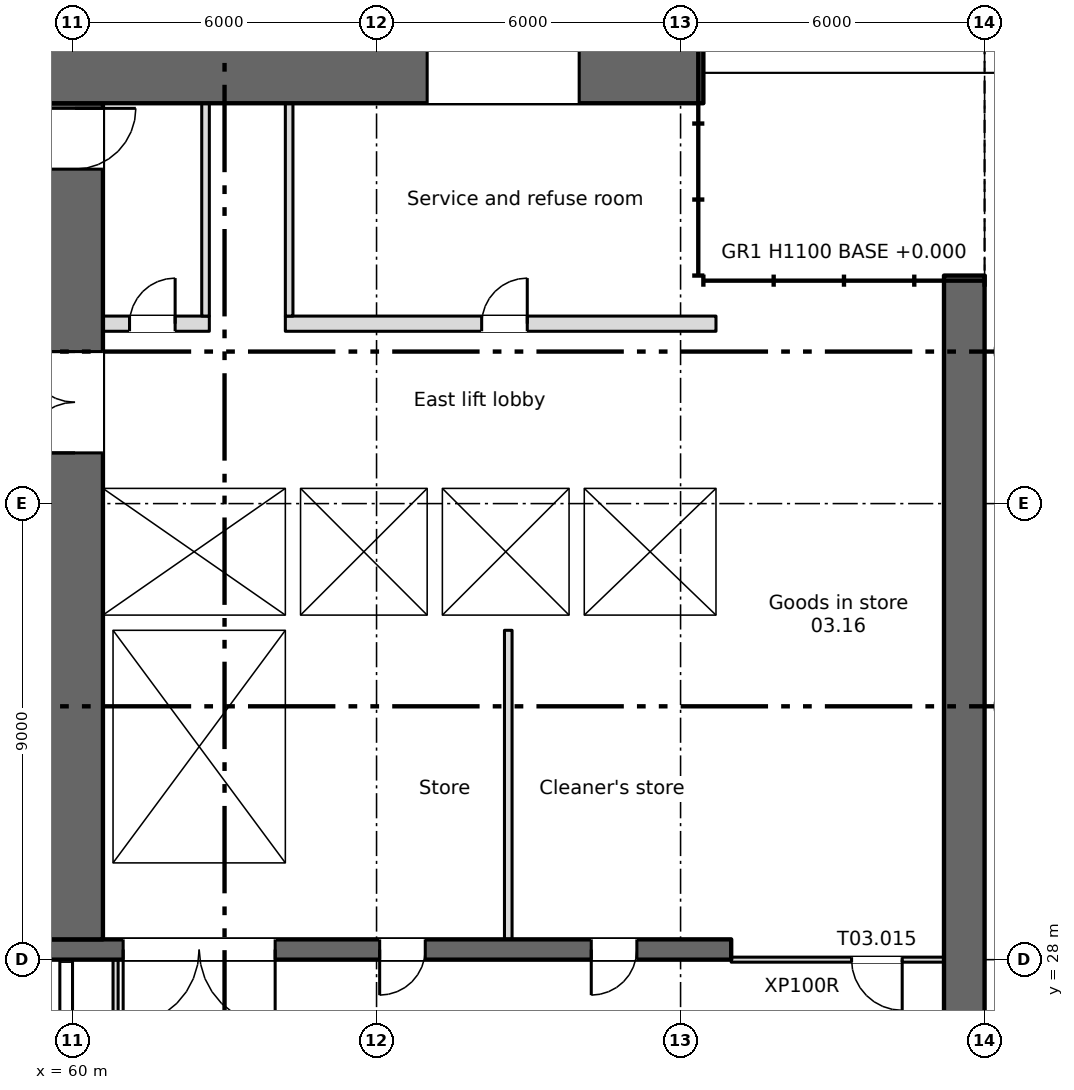
"""IFC4 building model, lengths in metres.
Left out: names, types, materials, properties, quantities, classifications, styles, units other than length and angle.
Written with IfcOpenShell. Run it as: python <this file> out.ifc"""

import sys

from ifc_helpers import new_model, si_unit, direction, frame, frame_2d, origin, place, context, subcontext, project, spatial, rectangle, extrude, element, fill, save


model = new_model("IFC4")
c1 = context("Model", 3, precision=1e-05, world=origin(), true_north=direction((0.0, 1.0)))
c2 = subcontext(c1, "Body", "Model", "MODEL_VIEW")
j1 = project(units=[si_unit("LENGTHUNIT", "METRE"), si_unit("PLANEANGLEUNIT", "RADIAN")], contexts=[c1])
p1 = place(None, origin())
s1 = spatial("IfcSite", under=j1, at=p1, CompositionType="ELEMENT")
p2 = place(p1, origin())
s2 = spatial("IfcBuilding", under=s1, at=p2, CompositionType="ELEMENT")
p3 = place(p2, origin())
s3 = spatial("IfcBuildingStorey", under=s2, at=p3, CompositionType="ELEMENT", Elevation=0.0)
p4 = place(p3, frame((77.6, 4.5, 0.0), z_axis=(0.0, 0.0, 1.0), x_axis=(0.0, 1.0, 0.0)))
e1 = element("IfcWall", 1, at=p4, inside=s3, PredefinedType="SHEAR", context=c2, shape_type="SweptSolid", body=[
    extrude(rectangle(XDim=37.0, YDim=0.8, at=frame_2d((18.5, 0.0))), origin(), (0.0, 0.0, 1.0), 6.0),
])
p5 = place(p3, frame((5.55, 45.45, 0.0), z_axis=(0.0, 0.0, 1.0), x_axis=(1.0, 0.0, 0.0)))
e2 = element("IfcWall", 2, at=p5, inside=s3, PredefinedType="SHEAR", context=c2, shape_type="SweptSolid", body=[
    extrude(rectangle(XDim=66.9, YDim=1.1, at=frame_2d((33.45, 0.0))), origin(), (0.0, 0.0, 1.0), 6.0),
])
p6 = place(p5, frame((61.45, 0.0, 0.0)))
e3 = element("IfcOpeningElement", 3, at=p6, cuts=e2, PredefinedType="OPENING", context=c2, shape_type="SweptSolid", body=[
    extrude(rectangle(XDim=3.0, YDim=3.0, at=frame_2d((1.5, 1.5))), frame((0.0, 0.56, 0.0), z_axis=(0.0, -1.0, 0.0), x_axis=(1.0, 0.0, 0.0)), (0.0, 0.0, 1.0), 1.12),
])
p7 = place(p3, frame((73.0, 28.2, 0.0), z_axis=(0.0, 0.0, 1.0), x_axis=(-1.0, 0.0, 0.0)))
e4 = element("IfcWall", 4, at=p7, inside=s3, PredefinedType="SHEAR", context=c2, shape_type="SweptSolid", body=[
    extrude(rectangle(XDim=66.3, YDim=0.4, at=frame_2d((33.15, 0.0))), origin(), (0.0, 0.0, 1.0), 6.0),
])
p8 = place(p7, frame((51.55, 0.0, 0.0)))
e5 = element("IfcOpeningElement", 5, at=p8, cuts=e4, PredefinedType="OPENING", context=c2, shape_type="SweptSolid", body=[
    extrude(rectangle(XDim=0.9, YDim=2.1, at=frame_2d((0.45, 1.05))), frame((0.0, 0.21, 0.0), z_axis=(0.0, -1.0, 0.0), x_axis=(1.0, 0.0, 0.0)), (0.0, 0.0, 1.0), 0.42),
])
p9 = place(p7, frame((16.837, 0.0, 0.0)))
e6 = element("IfcOpeningElement", 6, at=p9, cuts=e4, PredefinedType="OPENING", context=c2, shape_type="SweptSolid", body=[
    extrude(rectangle(XDim=0.9, YDim=2.1, at=frame_2d((0.45, 1.05))), frame((0.0, 0.21, 0.0), z_axis=(0.0, -1.0, 0.0), x_axis=(1.0, 0.0, 0.0)), (0.0, 0.0, 1.0), 0.42),
])
p10 = place(p7, frame((14.262, 0.0, 0.0)))
e7 = element("IfcOpeningElement", 7, at=p10, cuts=e4, PredefinedType="OPENING", context=c2, shape_type="SweptSolid", body=[
    extrude(rectangle(XDim=0.9, YDim=2.1, at=frame_2d((0.45, 1.05))), frame((0.0, 0.21, 0.0), z_axis=(0.0, -1.0, 0.0), x_axis=(1.0, 0.0, 0.0)), (0.0, 0.0, 1.0), 0.42),
])
p11 = place(p7, frame((64.05, 0.0, 0.0)))
e8 = element("IfcOpeningElement", 8, at=p11, cuts=e4, PredefinedType="OPENING", context=c2, shape_type="SweptSolid", body=[
    extrude(rectangle(XDim=0.9, YDim=2.1, at=frame_2d((0.45, 1.05))), frame((0.0, 0.21, 0.0), z_axis=(0.0, -1.0, 0.0), x_axis=(1.0, 0.0, 0.0)), (0.0, 0.0, 1.0), 0.42),
])
p12 = place(p7, frame((6.038, 0.0, 0.0)))
e9 = element("IfcOpeningElement", 9, at=p12, cuts=e4, PredefinedType="OPENING", context=c2, shape_type="SweptSolid", body=[
    extrude(rectangle(XDim=0.9, YDim=2.1, at=frame_2d((0.45, 1.05))), frame((0.0, 0.21, 0.0), z_axis=(0.0, -1.0, 0.0), x_axis=(1.0, 0.0, 0.0)), (0.0, 0.0, 1.0), 0.42),
])
p13 = place(p7, frame((1.863, 0.0, 0.0)))
e10 = element("IfcOpeningElement", 10, at=p13, cuts=e4, PredefinedType="OPENING", context=c2, shape_type="SweptSolid", body=[
    extrude(rectangle(XDim=0.9, YDim=2.1, at=frame_2d((0.45, 1.05))), frame((0.0, 0.21, 0.0), z_axis=(0.0, -1.0, 0.0), x_axis=(1.0, 0.0, 0.0)), (0.0, 0.0, 1.0), 0.42),
])
p14 = place(p7, frame((59.5, 0.0, 0.0)))
e11 = element("IfcOpeningElement", 11, at=p14, cuts=e4, PredefinedType="OPENING", context=c2, shape_type="SweptSolid", body=[
    extrude(rectangle(XDim=3.0, YDim=2.1, at=frame_2d((1.5, 1.05))), frame((0.0, 0.21, 0.0), z_axis=(0.0, -1.0, 0.0), x_axis=(1.0, 0.0, 0.0)), (0.0, 0.0, 1.0), 0.42),
])
p15 = place(p7, frame((32.5, 0.0, 0.0)))
e12 = element("IfcOpeningElement", 12, at=p15, cuts=e4, PredefinedType="OPENING", context=c2, shape_type="SweptSolid", body=[
    extrude(rectangle(XDim=3.0, YDim=2.1, at=frame_2d((1.5, 1.05))), frame((0.0, 0.21, 0.0), z_axis=(0.0, -1.0, 0.0), x_axis=(1.0, 0.0, 0.0)), (0.0, 0.0, 1.0), 0.42),
])
p16 = place(p7, frame((9.0, 0.0, 0.0)))
e13 = element("IfcOpeningElement", 13, at=p16, cuts=e4, PredefinedType="OPENING", context=c2, shape_type="SweptSolid", body=[
    extrude(rectangle(XDim=3.0, YDim=2.1, at=frame_2d((1.5, 1.05))), frame((0.0, 0.21, 0.0), z_axis=(0.0, -1.0, 0.0), x_axis=(1.0, 0.0, 0.0)), (0.0, 0.0, 1.0), 0.42),
])
p17 = place(p7, frame((43.0, 0.0, 0.0)))
e14 = element("IfcOpeningElement", 14, at=p17, cuts=e4, PredefinedType="OPENING", context=c2, shape_type="SweptSolid", body=[
    extrude(rectangle(XDim=2.0, YDim=2.1, at=frame_2d((1.0, 1.05))), frame((0.0, 0.21, 0.0), z_axis=(0.0, -1.0, 0.0), x_axis=(1.0, 0.0, 0.0)), (0.0, 0.0, 1.0), 0.42),
])
p18 = place(p7, frame((23.0, 0.0, 0.0)))
e15 = element("IfcOpeningElement", 15, at=p18, cuts=e4, PredefinedType="OPENING", context=c2, shape_type="SweptSolid", body=[
    extrude(rectangle(XDim=2.0, YDim=2.1, at=frame_2d((1.0, 1.05))), frame((0.0, 0.21, 0.0), z_axis=(0.0, -1.0, 0.0), x_axis=(1.0, 0.0, 0.0)), (0.0, 0.0, 1.0), 0.42),
])
p19 = place(p7, frame((39.05, 0.0, 0.0)))
e16 = element("IfcOpeningElement", 16, at=p19, cuts=e4, PredefinedType="OPENING", context=c2, shape_type="SweptSolid", body=[
    extrude(rectangle(XDim=2.4, YDim=2.1, at=frame_2d((1.2, 1.05))), frame((0.0, 0.21, 0.0), z_axis=(0.0, -1.0, 0.0), x_axis=(1.0, 0.0, 0.0)), (0.0, 0.0, 1.0), 0.42),
])
p20 = place(p7, frame((26.55, 0.0, 0.0)))
e17 = element("IfcOpeningElement", 17, at=p20, cuts=e4, PredefinedType="OPENING", context=c2, shape_type="SweptSolid", body=[
    extrude(rectangle(XDim=2.4, YDim=2.1, at=frame_2d((1.2, 1.05))), frame((0.0, 0.21, 0.0), z_axis=(0.0, -1.0, 0.0), x_axis=(1.0, 0.0, 0.0)), (0.0, 0.0, 1.0), 0.42),
])
p21 = place(p7, frame((56.1, 0.0, 0.0)))
e18 = element("IfcOpeningElement", 18, at=p21, cuts=e4, PredefinedType="OPENING", context=c2, shape_type="SweptSolid", body=[
    extrude(rectangle(XDim=2.4, YDim=2.1, at=frame_2d((1.2, 1.05))), frame((0.0, 0.21, 0.0), z_axis=(0.0, -1.0, 0.0), x_axis=(1.0, 0.0, 0.0)), (0.0, 0.0, 1.0), 0.42),
])
p22 = place(p7, frame((36.55, 0.0, 0.0)))
e19 = element("IfcOpeningElement", 19, at=p22, cuts=e4, PredefinedType="OPENING", context=c2, shape_type="SweptSolid", body=[
    extrude(rectangle(XDim=0.9, YDim=2.1, at=frame_2d((0.45, 1.05))), frame((0.0, 0.21, 0.0), z_axis=(0.0, -1.0, 0.0), x_axis=(1.0, 0.0, 0.0)), (0.0, 0.0, 1.0), 0.42),
])
p23 = place(p7, frame((30.55, 0.0, 0.0)))
e20 = element("IfcOpeningElement", 20, at=p23, cuts=e4, PredefinedType="OPENING", context=c2, shape_type="SweptSolid", body=[
    extrude(rectangle(XDim=0.9, YDim=2.1, at=frame_2d((0.45, 1.05))), frame((0.0, 0.21, 0.0), z_axis=(0.0, -1.0, 0.0), x_axis=(1.0, 0.0, 0.0)), (0.0, 0.0, 1.0), 0.42),
])
p24 = place(p3, frame((72.85, 28.4, 0.0), z_axis=(0.0, 0.0, 1.0), x_axis=(0.0, 1.0, 0.0)))
e21 = element("IfcWall", 21, at=p24, inside=s3, PredefinedType="SHEAR", context=c2, shape_type="SweptSolid", body=[
    extrude(rectangle(XDim=12.85, YDim=0.3, at=frame_2d((6.425, 0.0))), origin(), (0.0, 0.0, 1.0), 6.0),
])
p25 = place(p3, frame((64.35, 34.8, 0.0), z_axis=(0.0, 0.0, 1.0), x_axis=(0.0, 1.0, 0.0)))
e22 = element("IfcWall", 22, at=p25, inside=s3, PredefinedType="SHEAR", context=c2, shape_type="SweptSolid", body=[
    extrude(rectangle(XDim=2.5, YDim=0.3, at=frame_2d((1.25, 0.0))), origin(), (0.0, 0.0, 1.0), 6.0),
])
p26 = place(p3, frame((60.05, 28.4, 0.0), z_axis=(0.0, 0.0, 1.0), x_axis=(0.0, 1.0, 0.0)))
e23 = element("IfcWall", 23, at=p26, inside=s3, PredefinedType="SHEAR", context=c2, shape_type="SweptSolid", body=[
    extrude(rectangle(XDim=16.5, YDim=1.1, at=frame_2d((8.25, 0.0))), origin(), (0.0, 0.0, 1.0), 6.0),
])
p27 = place(p26, frame((9.6, 0.0, 0.0)))
e24 = element("IfcOpeningElement", 24, at=p27, cuts=e23, PredefinedType="OPENING", context=c2, shape_type="SweptSolid", body=[
    extrude(rectangle(XDim=2.0, YDim=2.1, at=frame_2d((1.0, 1.05))), frame((0.0, 0.56, 0.0), z_axis=(0.0, -1.0, 0.0), x_axis=(1.0, 0.0, 0.0)), (0.0, 0.0, 1.0), 1.12),
])
p28 = place(p26, frame((15.2, 0.0, 0.0)))
e25 = element("IfcOpeningElement", 25, at=p28, cuts=e23, PredefinedType="OPENING", context=c2, shape_type="SweptSolid", body=[
    extrude(rectangle(XDim=1.2, YDim=2.1, at=frame_2d((0.6, 1.05))), frame((0.0, 0.56, 0.0), z_axis=(0.0, -1.0, 0.0), x_axis=(1.0, 0.0, 0.0)), (0.0, 0.0, 1.0), 1.12),
])
p29 = place(p3, frame((60.7, 28.4, 0.0), z_axis=(0.0, 0.0, 1.0), x_axis=(0.0, 1.0, 0.0)))
e26 = element("IfcWall", 26, at=p29, inside=s3, PredefinedType="SHEAR", context=c2, shape_type="SweptSolid", body=[
    extrude(rectangle(XDim=6.1, YDim=0.2, at=frame_2d((3.05, 0.0))), origin(), (0.0, 0.0, 1.0), 6.0),
])
p30 = place(p3, frame((64.35, 28.4, 0.0), z_axis=(0.0, 0.0, 1.0), x_axis=(0.0, 1.0, 0.0)))
e27 = element("IfcWall", 27, at=p30, inside=s3, PredefinedType="SHEAR", context=c2, shape_type="SweptSolid", body=[
    extrude(rectangle(XDim=6.1, YDim=0.3, at=frame_2d((3.05, 0.0))), origin(), (0.0, 0.0, 1.0), 6.0),
])
p31 = place(p3, frame((60.6, 34.65, 0.0), z_axis=(0.0, 0.0, 1.0), x_axis=(1.0, 0.0, 0.0)))
e28 = element("IfcWall", 28, at=p31, inside=s3, PredefinedType="SHEAR", context=c2, shape_type="SweptSolid", body=[
    extrude(rectangle(XDim=12.1, YDim=0.3, at=frame_2d((6.05, 0.0))), origin(), (0.0, 0.0, 1.0), 6.0),
])
p32 = place(p3, frame((60.6, 37.45, 0.0), z_axis=(0.0, 0.0, 1.0), x_axis=(1.0, 0.0, 0.0)))
e29 = element("IfcWall", 29, at=p32, inside=s3, PredefinedType="SHEAR", context=c2, shape_type="SweptSolid", body=[
    extrude(rectangle(XDim=12.1, YDim=0.3, at=frame_2d((6.05, 0.0))), origin(), (0.0, 0.0, 1.0), 6.0),
])
p33 = place(p32, frame((1.25, 0.0, 0.0)))
e30 = element("IfcOpeningElement", 30, at=p33, cuts=e29, PredefinedType="OPENING", context=c2, shape_type="SweptSolid", body=[
    extrude(rectangle(XDim=1.1, YDim=2.1, at=frame_2d((0.55, 1.05))), frame((0.0, 0.16, 0.0), z_axis=(0.0, -1.0, 0.0), x_axis=(1.0, 0.0, 0.0)), (0.0, 0.0, 1.0), 0.32),
])
p34 = place(p32, frame((4.6, 0.0, 0.0)))
e31 = element("IfcOpeningElement", 31, at=p34, cuts=e29, PredefinedType="OPENING", context=c2, shape_type="SweptSolid", body=[
    extrude(rectangle(XDim=1.1, YDim=2.1, at=frame_2d((0.55, 1.05))), frame((0.0, 0.16, 0.0), z_axis=(0.0, -1.0, 0.0), x_axis=(1.0, 0.0, 0.0)), (0.0, 0.0, 1.0), 0.32),
])
p35 = place(p32, frame((7.4, 0.0, 0.0)))
e32 = element("IfcOpeningElement", 32, at=p35, cuts=e29, PredefinedType="OPENING", context=c2, shape_type="SweptSolid", body=[
    extrude(rectangle(XDim=1.1, YDim=2.1, at=frame_2d((0.55, 1.05))), frame((0.0, 0.16, 0.0), z_axis=(0.0, -1.0, 0.0), x_axis=(1.0, 0.0, 0.0)), (0.0, 0.0, 1.0), 0.32),
])
p36 = place(p32, frame((10.25, 0.0, 0.0)))
e33 = element("IfcOpeningElement", 33, at=p36, cuts=e29, PredefinedType="OPENING", context=c2, shape_type="SweptSolid", body=[
    extrude(rectangle(XDim=1.1, YDim=2.1, at=frame_2d((0.55, 1.05))), frame((0.0, 0.16, 0.0), z_axis=(0.0, -1.0, 0.0), x_axis=(1.0, 0.0, 0.0)), (0.0, 0.0, 1.0), 0.32),
])
p37 = place(p3, frame((60.6, 40.55, 0.0), z_axis=(0.0, 0.0, 1.0), x_axis=(1.0, 0.0, 0.0)))
e34 = element("IfcWall", 34, at=p37, inside=s3, PredefinedType="PARTITIONING", context=c2, shape_type="SweptSolid", body=[
    extrude(rectangle(XDim=2.1, YDim=0.3, at=frame_2d((1.05, 0.0))), origin(), (0.0, 0.0, 1.0), 6.0),
])
p38 = place(p37, frame((0.525, 0.0, 0.0)))
e35 = element("IfcOpeningElement", 35, at=p38, cuts=e34, PredefinedType="OPENING", context=c2, shape_type="SweptSolid", body=[
    extrude(rectangle(XDim=0.9, YDim=2.1, at=frame_2d((0.45, 1.05))), frame((0.0, 0.16, 0.0), z_axis=(0.0, -1.0, 0.0), x_axis=(1.0, 0.0, 0.0)), (0.0, 0.0, 1.0), 0.32),
])
p39 = place(p3, frame((64.2, 40.55, 0.0), z_axis=(0.0, 0.0, 1.0), x_axis=(1.0, 0.0, 0.0)))
e36 = element("IfcWall", 36, at=p39, inside=s3, PredefinedType="PARTITIONING", context=c2, shape_type="SweptSolid", body=[
    extrude(rectangle(XDim=8.5, YDim=0.3, at=frame_2d((4.25, 0.0))), origin(), (0.0, 0.0, 1.0), 6.0),
])
p40 = place(p39, frame((3.875, 0.0, 0.0)))
e37 = element("IfcOpeningElement", 37, at=p40, cuts=e36, PredefinedType="OPENING", context=c2, shape_type="SweptSolid", body=[
    extrude(rectangle(XDim=0.9, YDim=2.1, at=frame_2d((0.45, 1.05))), frame((0.0, 0.16, 0.0), z_axis=(0.0, -1.0, 0.0), x_axis=(1.0, 0.0, 0.0)), (0.0, 0.0, 1.0), 0.32),
])
for number, where, z_axis, x_axis in (
    (38, (67.15, 34.8, 0.0), (0.0, 0.0, 1.0), (0.0, 1.0, 0.0)),
    (39, (69.95, 34.8, 0.0), (0.0, 0.0, 1.0), (0.0, 1.0, 0.0)),
):
    element("IfcWall", number, at=place(p3, frame(where, z_axis=z_axis, x_axis=x_axis)), inside=s3, PredefinedType="SHEAR", context=c2, shape_type="SweptSolid", body=[
        extrude(rectangle(XDim=2.5, YDim=0.3, at=frame_2d((1.25, 0.0))), origin(), (0.0, 0.0, 1.0), 6.0),
    ])
for number, where, z_axis, x_axis in (
    (40, (62.625, 40.7, 0.0), (0.0, 0.0, 1.0), (0.0, 1.0, 0.0)),
    (41, (64.275, 40.7, 0.0), (0.0, 0.0, 1.0), (0.0, 1.0, 0.0)),
):
    element("IfcWall", number, at=place(p3, frame(where, z_axis=z_axis, x_axis=x_axis)), inside=s3, PredefinedType="PARTITIONING", context=c2, shape_type="SweptSolid", body=[
        extrude(rectangle(XDim=4.2, YDim=0.15, at=frame_2d((2.1, 0.0))), origin(), (0.0, 0.0, 1.0), 6.0),
    ])
p41 = place(p3, frame((68.6, 28.4, 0.0), z_axis=(0.0, 0.0, 1.0), x_axis=(0.0, 1.0, 0.0)))
e42 = element("IfcWall", 42, at=p41, inside=s3, PredefinedType="PARTITIONING", context=c2, shape_type="SweptSolid", body=[
    extrude(rectangle(XDim=6.1, YDim=0.15, at=frame_2d((3.05, 0.0))), origin(), (0.0, 0.0, 1.0), 6.0),
])
p42 = place(p3, frame((73.0, 28.0, 0.0), z_axis=(0.0, 0.0, 1.0), x_axis=(1.0, 0.0, 0.0)))
e43 = element("IfcWall", 43, at=p42, inside=s3, PredefinedType="PARTITIONING", context=c2, shape_type="SweptSolid", body=[
    extrude(rectangle(XDim=4.2, YDim=0.1, at=frame_2d((2.1, 0.0))), origin(), (0.0, 0.0, 1.0), 6.0),
])
p43 = place(p42, frame((2.375, 0.0, 0.0)))
e44 = element("IfcOpeningElement", 44, at=p43, cuts=e43, PredefinedType="OPENING", context=c2, shape_type="SweptSolid", body=[
    extrude(rectangle(XDim=1.0, YDim=2.1, at=frame_2d((0.5, 1.05))), frame((0.0, 0.06, 0.0), z_axis=(0.0, -1.0, 0.0), x_axis=(1.0, 0.0, 0.0)), (0.0, 0.0, 1.0), 0.12),
])
p44 = place(p3, frame((60.85, 25.05, 0.0), z_axis=(0.0, 0.0, 1.0), x_axis=(0.0, 1.0, 0.0)))
e45 = element("IfcWall", 45, at=p44, inside=s3, PredefinedType="PARTITIONING", context=c2, shape_type="SweptSolid", body=[
    extrude(rectangle(XDim=2.95, YDim=0.1, at=frame_2d((1.475, 0.0))), origin(), (0.0, 0.0, 1.0), 6.0),
])
p45 = place(p6, origin())
e46 = element("IfcDoor", 46, at=p45, inside=s3, OperationType="ROLLINGUP", PredefinedType="DOOR", context=c2, shape_type="SweptSolid", body=[
    extrude(rectangle(XDim=3.0, YDim=3.0, at=frame_2d((1.5, 1.5))), frame((0.0, 0.025, 0.0), z_axis=(0.0, -1.0, 0.0), x_axis=(1.0, 0.0, 0.0)), (0.0, 0.0, 1.0), 0.05),
])
fill(e3, e46)
p46 = place(p38, origin())
e47 = element("IfcDoor", 47, at=p46, inside=s3, OperationType="SINGLE_SWING_RIGHT", PredefinedType="DOOR", context=c2, shape_type="SweptSolid", body=[
    extrude(rectangle(XDim=0.9, YDim=2.1, at=frame_2d((0.45, 1.05))), frame((0.0, 0.025, 0.0), z_axis=(0.0, -1.0, 0.0), x_axis=(1.0, 0.0, 0.0)), (0.0, 0.0, 1.0), 0.05),
])
fill(e35, e47)
p47 = place(p12, origin())
e48 = element("IfcDoor", 48, at=p47, inside=s3, OperationType="SINGLE_SWING_RIGHT", PredefinedType="DOOR", context=c2, shape_type="SweptSolid", body=[
    extrude(rectangle(XDim=0.9, YDim=2.1, at=frame_2d((0.45, 1.05))), frame((0.0, 0.025, 0.0), z_axis=(0.0, -1.0, 0.0), x_axis=(1.0, 0.0, 0.0)), (0.0, 0.0, 1.0), 0.05),
])
fill(e9, e48)
p48 = place(p13, origin())
e49 = element("IfcDoor", 49, at=p48, inside=s3, OperationType="SINGLE_SWING_RIGHT", PredefinedType="DOOR", context=c2, shape_type="SweptSolid", body=[
    extrude(rectangle(XDim=0.9, YDim=2.1, at=frame_2d((0.45, 1.05))), frame((0.0, 0.025, 0.0), z_axis=(0.0, -1.0, 0.0), x_axis=(1.0, 0.0, 0.0)), (0.0, 0.0, 1.0), 0.05),
])
fill(e10, e49)
p49 = place(p40, origin())
e50 = element("IfcDoor", 50, at=p49, inside=s3, OperationType="SINGLE_SWING_RIGHT", PredefinedType="DOOR", context=c2, shape_type="SweptSolid", body=[
    extrude(rectangle(XDim=0.9, YDim=2.1, at=frame_2d((0.45, 1.05))), frame((0.0, 0.025, 0.0), z_axis=(0.0, -1.0, 0.0), x_axis=(1.0, 0.0, 0.0)), (0.0, 0.0, 1.0), 0.05),
])
fill(e37, e50)
p50 = place(p33, origin())
e51 = element("IfcDoor", 51, at=p50, inside=s3, OperationType="SLIDING_TO_LEFT", PredefinedType="DOOR", context=c2, shape_type="SweptSolid", body=[
    extrude(rectangle(XDim=1.1, YDim=2.1, at=frame_2d((0.55, 1.05))), frame((0.0, 0.025, 0.0), z_axis=(0.0, -1.0, 0.0), x_axis=(1.0, 0.0, 0.0)), (0.0, 0.0, 1.0), 0.05),
])
fill(e30, e51)
p51 = place(p34, origin())
e52 = element("IfcDoor", 52, at=p51, inside=s3, OperationType="SLIDING_TO_LEFT", PredefinedType="DOOR", context=c2, shape_type="SweptSolid", body=[
    extrude(rectangle(XDim=1.1, YDim=2.1, at=frame_2d((0.55, 1.05))), frame((0.0, 0.025, 0.0), z_axis=(0.0, -1.0, 0.0), x_axis=(1.0, 0.0, 0.0)), (0.0, 0.0, 1.0), 0.05),
])
fill(e31, e52)
p52 = place(p35, origin())
e53 = element("IfcDoor", 53, at=p52, inside=s3, OperationType="SLIDING_TO_LEFT", PredefinedType="DOOR", context=c2, shape_type="SweptSolid", body=[
    extrude(rectangle(XDim=1.1, YDim=2.1, at=frame_2d((0.55, 1.05))), frame((0.0, 0.025, 0.0), z_axis=(0.0, -1.0, 0.0), x_axis=(1.0, 0.0, 0.0)), (0.0, 0.0, 1.0), 0.05),
])
fill(e32, e53)
p53 = place(p36, origin())
e54 = element("IfcDoor", 54, at=p53, inside=s3, OperationType="SLIDING_TO_LEFT", PredefinedType="DOOR", context=c2, shape_type="SweptSolid", body=[
    extrude(rectangle(XDim=1.1, YDim=2.1, at=frame_2d((0.55, 1.05))), frame((0.0, 0.025, 0.0), z_axis=(0.0, -1.0, 0.0), x_axis=(1.0, 0.0, 0.0)), (0.0, 0.0, 1.0), 0.05),
])
fill(e33, e54)
p54 = place(p16, origin())
e55 = element("IfcDoor", 55, at=p54, inside=s3, OperationType="DOUBLE_DOOR_SINGLE_SWING", PredefinedType="DOOR", context=c2, shape_type="SweptSolid", body=[
    extrude(rectangle(XDim=3.0, YDim=2.1, at=frame_2d((1.5, 1.05))), frame((0.0, 0.025, 0.0), z_axis=(0.0, -1.0, 0.0), x_axis=(1.0, 0.0, 0.0)), (0.0, 0.0, 1.0), 0.05),
])
fill(e13, e55)
p55 = place(p27, origin())
e56 = element("IfcDoor", 56, at=p55, inside=s3, OperationType="DOUBLE_DOOR_SINGLE_SWING", PredefinedType="DOOR", context=c2, shape_type="SweptSolid", body=[
    extrude(rectangle(XDim=2.0, YDim=2.1, at=frame_2d((1.0, 1.05))), frame((0.0, 0.025, 0.0), z_axis=(0.0, -1.0, 0.0), x_axis=(1.0, 0.0, 0.0)), (0.0, 0.0, 1.0), 0.05),
])
fill(e24, e56)
p56 = place(p28, origin())
e57 = element("IfcDoor", 57, at=p56, inside=s3, OperationType="SINGLE_SWING_RIGHT", PredefinedType="DOOR", context=c2, shape_type="SweptSolid", body=[
    extrude(rectangle(XDim=1.2, YDim=2.1, at=frame_2d((0.6, 1.05))), frame((0.0, 0.025, 0.0), z_axis=(0.0, -1.0, 0.0), x_axis=(1.0, 0.0, 0.0)), (0.0, 0.0, 1.0), 0.05),
])
fill(e25, e57)
p57 = place(p43, frame((1.0, 0.0, 0.0), z_axis=(0.0, 0.0, 1.0), x_axis=(-1.0, 0.0, 0.0)))
e58 = element("IfcDoor", 58, at=p57, inside=s3, OperationType="SINGLE_SWING_LEFT", PredefinedType="DOOR", context=c2, shape_type="SweptSolid", body=[
    extrude(rectangle(XDim=1.0, YDim=2.1, at=frame_2d((0.5, 1.05))), frame((0.0, 0.025, 0.0), z_axis=(0.0, -1.0, 0.0), x_axis=(1.0, 0.0, 0.0)), (0.0, 0.0, 1.0), 0.05),
])
fill(e44, e58)
save(model, sys.argv[1])
